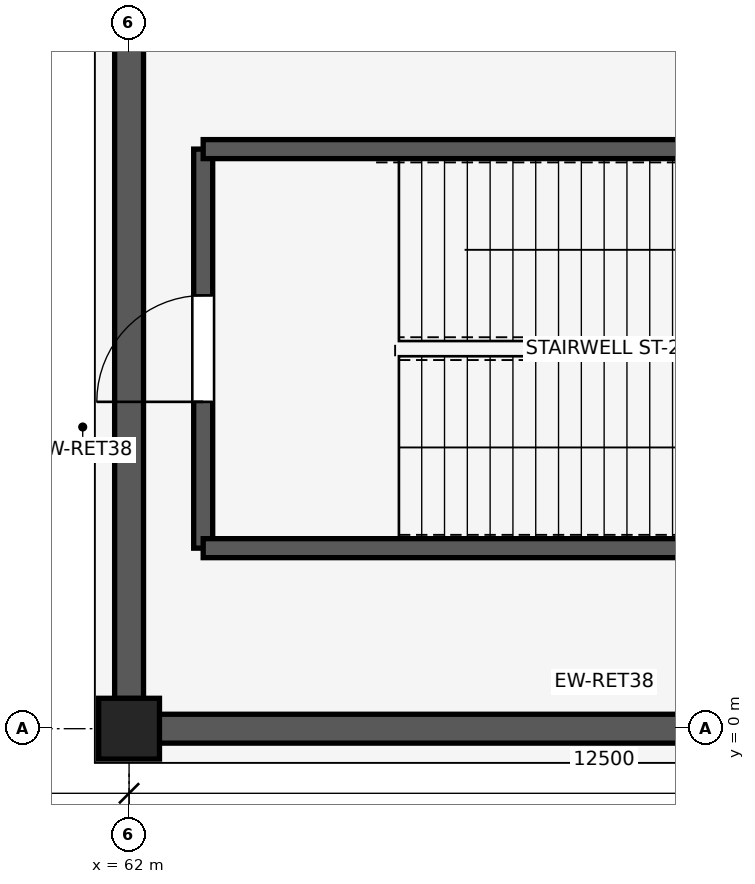
"""IFC4 building model, lengths in metres.
Left out: names, types, materials, properties, quantities, classifications, styles, units other than length and angle.
Written with IfcOpenShell. Run it as: python <this file> out.ifc"""

import sys

from ifc_helpers import new_model, si_unit, direction, frame, frame_2d, origin, origin_2d, place, context, subcontext, project, spatial, rectangle, extrude, element, fill, save


model = new_model("IFC4")
c1 = context("Model", 3, precision=1e-05, world=origin(), true_north=direction((0.0, 1.0)))
c2 = subcontext(c1, "Body", "Model", "MODEL_VIEW")
j1 = project(units=[si_unit("LENGTHUNIT", "METRE"), si_unit("PLANEANGLEUNIT", "RADIAN")], contexts=[c1])
p1 = place(None, origin())
s1 = spatial("IfcSite", under=j1, at=p1, CompositionType="ELEMENT")
p2 = place(p1, origin())
s2 = spatial("IfcBuilding", under=s1, at=p2, CompositionType="ELEMENT")
p3 = place(p2, frame((0.0, 0.0, -5.4)))
s3 = spatial("IfcBuildingStorey", under=s2, at=p3, CompositionType="ELEMENT", Elevation=-5.4)
p4 = place(p3, frame((62.0, 0.0, 0.0), z_axis=(0.0, 0.0, 1.0), x_axis=(1.0, 0.0, 0.0)))
e1 = element("IfcColumn", 1, at=p4, inside=s3, PredefinedType="COLUMN", context=c2, shape_type="SweptSolid", body=[
    extrude(rectangle(XDim=0.8, YDim=0.8, at=origin_2d()), origin(), (0.0, 0.0, 1.0), 5.4),
])
p5 = place(p3, frame((62.397, 0.0, 0.0), z_axis=(0.0, 0.0, 1.0), x_axis=(1.0, 0.0, 0.0)))
e2 = element("IfcWall", 2, at=p5, inside=s3, PredefinedType="SOLIDWALL", context=c2, shape_type="SweptSolid", body=[
    extrude(rectangle(XDim=11.706, YDim=0.38, at=frame_2d((5.853, 0.0))), origin(), (0.0, 0.0, 1.0), 4.43),
])
p6 = place(p3, frame((62.0, 0.397, 0.0), z_axis=(0.0, 0.0, 1.0), x_axis=(0.0, 1.0, 0.0)))
e3 = element("IfcWall", 3, at=p6, inside=s3, PredefinedType="SOLIDWALL", context=c2, shape_type="SweptSolid", body=[
    extrude(rectangle(XDim=10.206, YDim=0.38, at=frame_2d((5.103, 0.0))), origin(), (0.0, 0.0, 1.0), 4.43),
])
p7 = place(p3, frame((62.975, 7.625, 0.0), z_axis=(0.0, 0.0, 1.0), x_axis=(0.0, -1.0, 0.0)))
e4 = element("IfcWall", 4, at=p7, inside=s3, PredefinedType="SHEAR", context=c2, shape_type="SweptSolid", body=[
    extrude(rectangle(XDim=5.25, YDim=0.25, at=frame_2d((2.625, 0.0))), origin(), (0.0, 0.0, 1.0), 5.05),
])
p8 = place(p7, frame((1.925, 0.0, 0.0)))
e5 = element("IfcOpeningElement", 5, at=p8, cuts=e4, PredefinedType="OPENING", context=c2, shape_type="SweptSolid", body=[
    extrude(rectangle(XDim=1.4, YDim=2.2, at=frame_2d((0.7, 1.1))), frame((0.0, 0.135, 0.0), z_axis=(0.0, -1.0, 0.0), x_axis=(1.0, 0.0, 0.0)), (0.0, 0.0, 1.0), 0.27),
])
for number, where, z_axis, x_axis in (
    (6, (62.975, 2.375, 0.0), (0.0, 0.0, 1.0), (1.0, 0.0, 0.0)),
    (7, (73.425, 7.625, 0.0), (0.0, 0.0, 1.0), (-1.0, 0.0, 0.0)),
):
    element("IfcWall", number, at=place(p3, frame(where, z_axis=z_axis, x_axis=x_axis)), inside=s3, PredefinedType="SHEAR", context=c2, shape_type="SweptSolid", body=[
        extrude(rectangle(XDim=10.45, YDim=0.25, at=frame_2d((5.225, 0.0))), origin(), (0.0, 0.0, 1.0), 5.05),
    ])
p9 = place(p8, frame((1.4, 0.0, 0.0), z_axis=(0.0, 0.0, 1.0), x_axis=(-1.0, 0.0, 0.0)))
e8 = element("IfcDoor", 8, at=p9, inside=s3, OperationType="SINGLE_SWING_LEFT", PredefinedType="DOOR", context=c2, shape_type="SweptSolid", body=[
    extrude(rectangle(XDim=1.4, YDim=2.2, at=frame_2d((0.7, 1.1))), frame((0.0, 0.025, 0.0), z_axis=(0.0, -1.0, 0.0), x_axis=(1.0, 0.0, 0.0)), (0.0, 0.0, 1.0), 0.05),
])
fill(e5, e8)
save(model, sys.argv[1])
